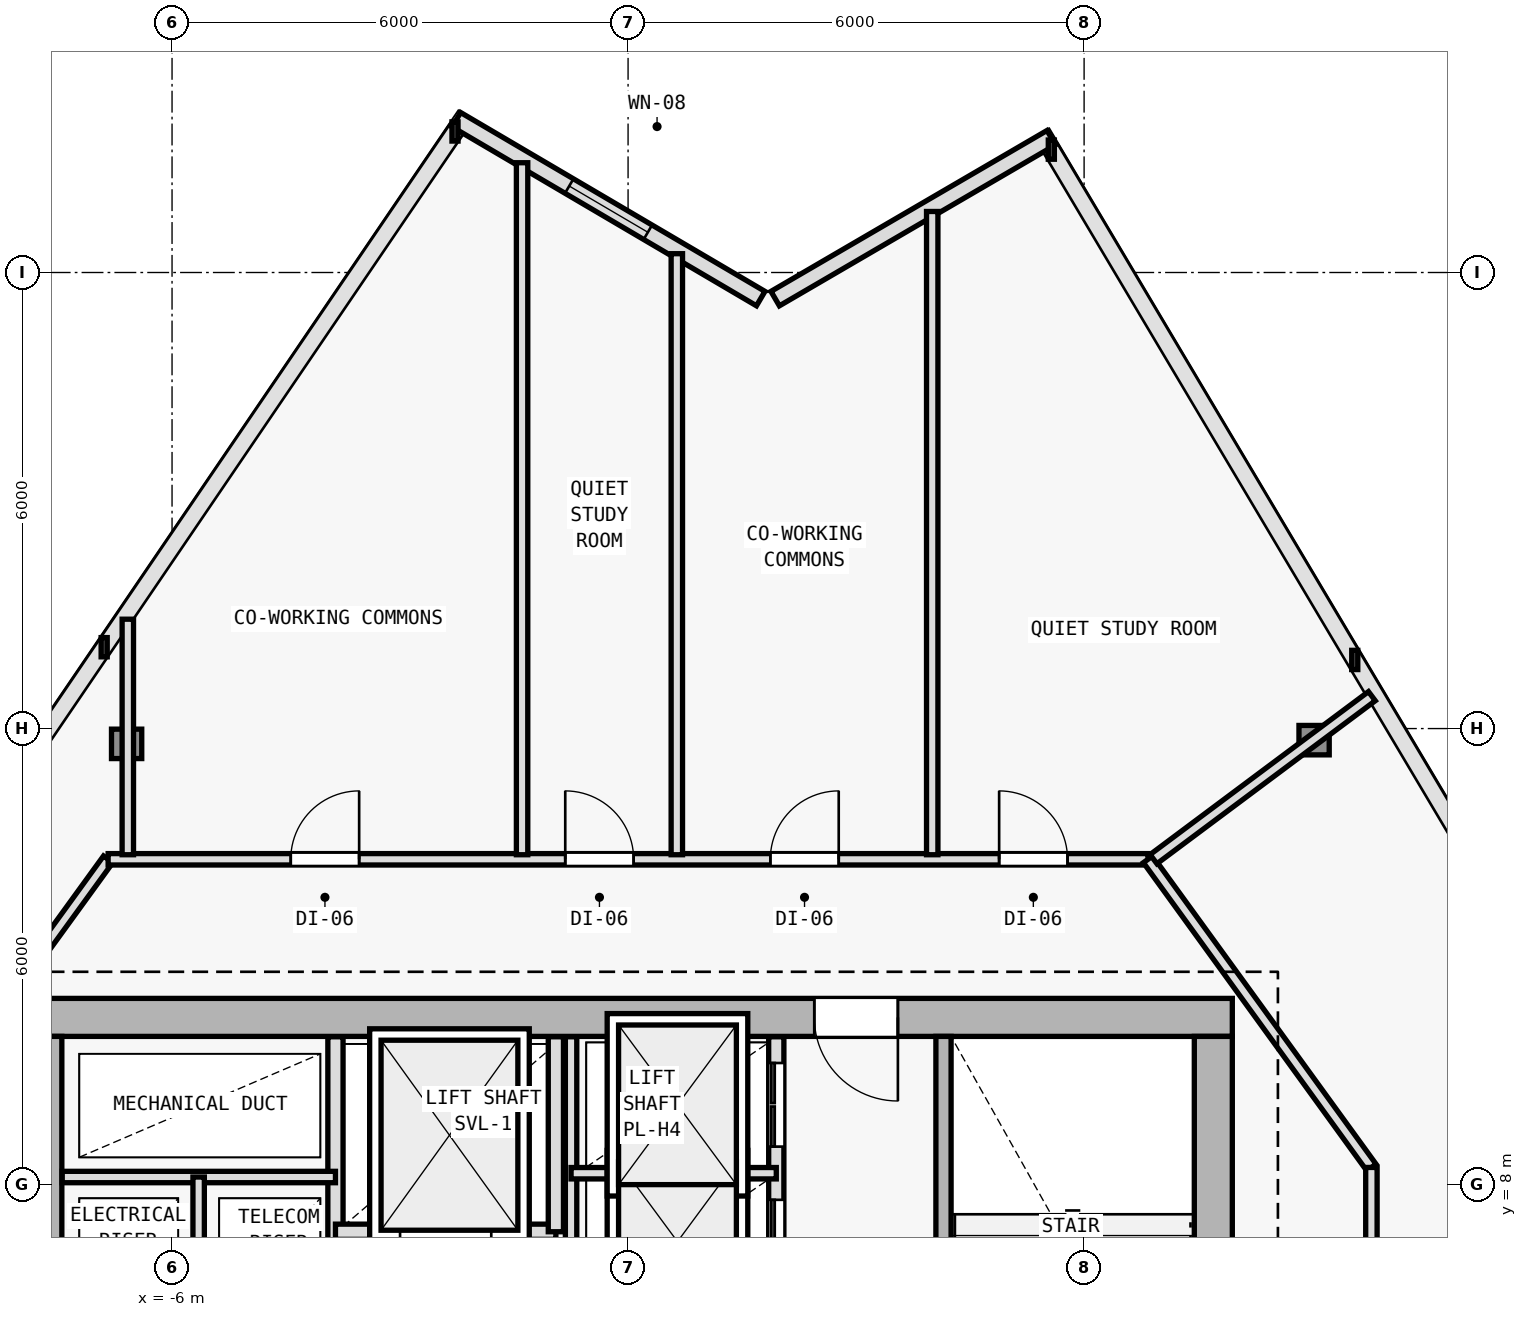
"""IFC4 building model, lengths in metres.
Left out: names, types, materials, properties, quantities, classifications, styles, units other than length and angle.
Written with IfcOpenShell. Run it as: python <this file> out.ifc"""

import sys

from ifc_helpers import new_model, si_unit, direction, frame, frame_2d, origin, origin_2d, place, context, subcontext, project, spatial, rectangle, i_section, extrude, element, fill, save


model = new_model("IFC4")
c1 = context("Model", 3, precision=1e-05, world=origin(), true_north=direction((0.0, 1.0)))
c2 = subcontext(c1, "Body", "Model", "MODEL_VIEW")
j1 = project(units=[si_unit("LENGTHUNIT", "METRE"), si_unit("PLANEANGLEUNIT", "RADIAN")], contexts=[c1])
p1 = place(None, origin())
s1 = spatial("IfcSite", under=j1, at=p1, CompositionType="ELEMENT")
p2 = place(p1, origin())
s2 = spatial("IfcBuilding", under=s1, at=p2, CompositionType="ELEMENT")
p3 = place(p2, frame((0.0, 0.0, 190.2)))
s3 = spatial("IfcBuildingStorey", under=s2, at=p3, CompositionType="ELEMENT", Elevation=190.2)
for number, where, z_axis, x_axis in (
    (1, (7.7, 10.2, 0.0), (0.0, 0.0, 1.0), (1.0, 0.0, 0.0)),
    (2, (-7.7, 10.2, 0.0), (0.0, 0.0, 1.0), (1.0, 0.0, 0.0)),
):
    element("IfcColumn", number, at=place(p3, frame(where, z_axis=z_axis, x_axis=x_axis)), inside=s3, PredefinedType="COLUMN", context=c2, shape_type="SweptSolid", body=[
        extrude(i_section(OverallWidth=0.404, OverallDepth=0.407, WebThickness=0.017, FlangeThickness=0.028, FilletRadius=0.015, at=origin_2d()), origin(), (0.0, 0.0, 1.0), 4.5),
    ])
p4 = place(p3, frame((9.026, 13.847, 0.006), z_axis=(-0.009354007007, -0.002012199182, 0.999954225756), x_axis=(0.210305364179, -0.977635746993, 0.0)))
e3 = element("IfcColumn", 3, at=p4, inside=s3, PredefinedType="COLUMN", context=c2, shape_type="SweptSolid", body=[
    extrude(i_section(OverallWidth=0.398, OverallDepth=0.387, WebThickness=0.013, FlangeThickness=0.022, FilletRadius=0.015, at=origin_2d()), origin(), (0.0, 0.0, 1.0), 4.489),
])
p5 = place(p3, frame((-6.598, 13.799, 0.006), z_axis=(0.007015639536, -0.002012237696, 0.999973365496), x_axis=(0.275705143097, 0.961242255662, 0.0)))
e4 = element("IfcColumn", 4, at=p5, inside=s3, PredefinedType="COLUMN", context=c2, shape_type="SweptSolid", body=[
    extrude(i_section(OverallWidth=0.398, OverallDepth=0.387, WebThickness=0.013, FlangeThickness=0.022, FilletRadius=0.015, at=origin_2d()), origin(), (0.0, 0.0, 1.0), 4.489),
])
p6 = place(p3, frame((1.935, 19.656, 0.0), z_axis=(0.0, 0.0, 1.0), x_axis=(0.863987356641, 0.503513502862, 0.0)))
e5 = element("IfcWall", 5, at=p6, inside=s3, PredefinedType="SOLIDWALL", context=c2, shape_type="SweptSolid", body=[
    extrude(rectangle(XDim=4.204, YDim=0.22, at=frame_2d((2.102, 0.0))), origin(), (0.0, 0.0, 1.0), 4.25),
])
p7 = place(p3, frame((-2.259, 22.01, 0.0), z_axis=(0.0, 0.0, 1.0), x_axis=(0.862123324624, -0.506698503193, 0.0)))
e6 = element("IfcWall", 6, at=p7, inside=s3, PredefinedType="SOLIDWALL", context=c2, shape_type="SweptSolid", body=[
    extrude(rectangle(XDim=4.645, YDim=0.22, at=frame_2d((2.322, 0.0))), origin(), (0.0, 0.0, 1.0), 4.25),
])
p8 = place(p7, frame((1.722, 0.0, 0.62)))
e7 = element("IfcOpeningElement", 7, at=p8, cuts=e6, PredefinedType="OPENING", context=c2, shape_type="SweptSolid", body=[
    extrude(rectangle(XDim=1.2, YDim=1.8, at=frame_2d((0.6, 0.9))), frame((0.0, 0.12, 0.0), z_axis=(0.0, -1.0, 0.0), x_axis=(1.0, 0.0, 0.0)), (0.0, 0.0, 1.0), 0.24),
])
p9 = place(p3, frame((7.95, 10.2, 0.0), z_axis=(0.0, 0.0, 1.0), x_axis=(-1.0, 0.0, 0.0)))
e8 = element("IfcWall", 8, at=p9, inside=s3, PredefinedType="SHEAR", context=c2, shape_type="SweptSolid", body=[
    extrude(rectangle(XDim=15.9, YDim=0.5, at=frame_2d((7.95, 0.0))), origin(), (0.0, 0.0, 1.0), 4.25),
])
p10 = place(p9, frame((4.4, 0.0, 0.0)))
e9 = element("IfcOpeningElement", 9, at=p10, cuts=e8, PredefinedType="OPENING", context=c2, shape_type="SweptSolid", body=[
    extrude(rectangle(XDim=1.1, YDim=2.15, at=frame_2d((0.55, 1.075))), frame((0.0, 0.26, 0.0), z_axis=(0.0, -1.0, 0.0), x_axis=(1.0, 0.0, 0.0)), (0.0, 0.0, 1.0), 0.52),
])
p11 = place(p3, frame((-7.7, -9.15, 0.0), z_axis=(0.0, 0.0, 1.0), x_axis=(0.0, 1.0, 0.0)))
e10 = element("IfcWall", 10, at=p11, inside=s3, PredefinedType="SHEAR", context=c2, shape_type="SweptSolid", body=[
    extrude(rectangle(XDim=19.1, YDim=0.5, at=frame_2d((9.55, 0.0))), origin(), (0.0, 0.0, 1.0), 4.25),
])
p12 = place(p11, frame((12.7, 0.0, 0.0)))
e11 = element("IfcOpeningElement", 11, at=p12, cuts=e10, PredefinedType="OPENING", context=c2, shape_type="SweptSolid", body=[
    extrude(rectangle(XDim=1.1, YDim=2.15, at=frame_2d((0.55, 1.075))), frame((0.0, 0.26, 0.0), z_axis=(0.0, -1.0, 0.0), x_axis=(1.0, 0.0, 0.0)), (0.0, 0.0, 1.0), 0.52),
])
p13 = place(p3, frame((7.7, 9.95, 0.0), z_axis=(0.0, 0.0, 1.0), x_axis=(0.0, -1.0, 0.0)))
e12 = element("IfcWall", 12, at=p13, inside=s3, PredefinedType="SHEAR", context=c2, shape_type="SweptSolid", body=[
    extrude(rectangle(XDim=19.1, YDim=0.5, at=frame_2d((9.55, 0.0))), origin(), (0.0, 0.0, 1.0), 4.25),
])
p14 = place(p3, frame((-3.85, 1.35, 0.0), z_axis=(0.0, 0.0, 1.0), x_axis=(0.0, 1.0, 0.0)))
e13 = element("IfcWall", 13, at=p14, inside=s3, PredefinedType="SOLIDWALL", context=c2, shape_type="SweptSolid", body=[
    extrude(rectangle(XDim=8.595, YDim=0.2, at=frame_2d((4.297, 0.0))), origin(), (0.0, 0.0, 1.0), 4.25),
])
p15 = place(p14, frame((1.5, 0.0, 0.0)))
e14 = element("IfcOpeningElement", 14, at=p15, cuts=e13, PredefinedType="OPENING", context=c2, shape_type="SweptSolid", body=[
    extrude(rectangle(XDim=1.0, YDim=2.15, at=frame_2d((0.5, 1.075))), frame((0.0, 0.11, 0.0), z_axis=(0.0, -1.0, 0.0), x_axis=(1.0, 0.0, 0.0)), (0.0, 0.0, 1.0), 0.22),
])
p16 = place(p14, frame((3.18, 0.0, 0.0)))
e15 = element("IfcOpeningElement", 15, at=p16, cuts=e13, PredefinedType="OPENING", context=c2, shape_type="SweptSolid", body=[
    extrude(rectangle(XDim=1.0, YDim=2.15, at=frame_2d((0.5, 1.075))), frame((0.0, 0.11, 0.0), z_axis=(0.0, -1.0, 0.0), x_axis=(1.0, 0.0, 0.0)), (0.0, 0.0, 1.0), 0.22),
])
p17 = place(p3, frame((-7.445, 8.1, 0.0), z_axis=(0.0, 0.0, 1.0), x_axis=(1.0, 0.0, 0.0)))
e16 = element("IfcWall", 16, at=p17, inside=s3, PredefinedType="PARTITIONING", context=c2, shape_type="SweptSolid", body=[
    extrude(rectangle(XDim=3.595, YDim=0.15, at=frame_2d((1.797, 0.0))), origin(), (0.0, 0.0, 1.0), 4.25),
])
p18 = place(p3, frame((-5.65, 6.05, 0.0), z_axis=(0.0, 0.0, 1.0), x_axis=(0.0, 1.0, 0.0)))
e17 = element("IfcWall", 17, at=p18, inside=s3, PredefinedType="PARTITIONING", context=c2, shape_type="SweptSolid", body=[
    extrude(rectangle(XDim=2.05, YDim=0.15, at=frame_2d((1.025, 0.0))), origin(), (0.0, 0.0, 1.0), 4.25),
])
p19 = place(p3, frame((4.15, 2.75, 0.0), z_axis=(0.0, 0.0, 1.0), x_axis=(0.0, 1.0, 0.0)))
e18 = element("IfcWall", 18, at=p19, inside=s3, PredefinedType="SOLIDWALL", context=c2, shape_type="SweptSolid", body=[
    extrude(rectangle(XDim=7.2, YDim=0.2, at=frame_2d((3.6, 0.0))), origin(), (0.0, 0.0, 1.0), 4.25),
])
p20 = place(p19, frame((0.35, 0.0, 0.0)))
e19 = element("IfcOpeningElement", 19, at=p20, cuts=e18, PredefinedType="OPENING", context=c2, shape_type="SweptSolid", body=[
    extrude(rectangle(XDim=1.0, YDim=2.15, at=frame_2d((0.5, 1.075))), frame((0.0, 0.11, 0.0), z_axis=(0.0, -1.0, 0.0), x_axis=(1.0, 0.0, 0.0)), (0.0, 0.0, 1.0), 0.22),
])
p21 = place(p3, frame((-3.85, 7.38, 0.0), z_axis=(0.0, 0.0, 1.0), x_axis=(1.0, 0.0, 0.0)))
e20 = element("IfcWall", 20, at=p21, inside=s3, PredefinedType="SOLIDWALL", context=c2, shape_type="SweptSolid", body=[
    extrude(rectangle(XDim=2.9, YDim=0.2, at=frame_2d((1.45, 0.0))), origin(), (0.0, 0.0, 1.0), 4.25),
])
p22 = place(p21, frame((0.85, 0.0, 0.0)))
e21 = element("IfcOpeningElement", 21, at=p22, cuts=e20, PredefinedType="OPENING", context=c2, shape_type="SweptSolid", body=[
    extrude(rectangle(XDim=1.2, YDim=2.2, at=frame_2d((0.6, 1.1))), frame((0.0, 0.11, 0.0), z_axis=(0.0, -1.0, 0.0), x_axis=(1.0, 0.0, 0.0)), (0.0, 0.0, 1.0), 0.22),
])
p23 = place(p3, frame((-0.95, 7.38, 0.0), z_axis=(0.0, 0.0, 1.0), x_axis=(0.0, 1.0, 0.0)))
e22 = element("IfcWall", 22, at=p23, inside=s3, PredefinedType="SOLIDWALL", context=c2, shape_type="SweptSolid", body=[
    extrude(rectangle(XDim=2.565, YDim=0.2, at=frame_2d((1.283, 0.0))), origin(), (0.0, 0.0, 1.0), 4.25),
])
p24 = place(p3, frame((1.95, 2.65, 0.0), z_axis=(0.0, 0.0, 1.0), x_axis=(0.0, 1.0, 0.0)))
e23 = element("IfcWall", 23, at=p24, inside=s3, PredefinedType="SOLIDWALL", context=c2, shape_type="SweptSolid", body=[
    extrude(rectangle(XDim=7.295, YDim=0.2, at=frame_2d((3.647, 0.0))), origin(), (0.0, 0.0, 1.0), 4.25),
])
p25 = place(p24, frame((0.45, 0.0, 0.0)))
e24 = element("IfcOpeningElement", 24, at=p25, cuts=e23, PredefinedType="OPENING", context=c2, shape_type="SweptSolid", body=[
    extrude(rectangle(XDim=1.1, YDim=2.15, at=frame_2d((0.55, 1.075))), frame((0.0, 0.11, 0.0), z_axis=(0.0, -1.0, 0.0), x_axis=(1.0, 0.0, 0.0)), (0.0, 0.0, 1.0), 0.22),
])
p26 = place(p24, frame((2.25, 0.0, 0.0)))
e25 = element("IfcOpeningElement", 25, at=p26, cuts=e23, PredefinedType="OPENING", context=c2, shape_type="SweptSolid", body=[
    extrude(rectangle(XDim=1.1, YDim=2.15, at=frame_2d((0.55, 1.075))), frame((0.0, 0.11, 0.0), z_axis=(0.0, -1.0, 0.0), x_axis=(1.0, 0.0, 0.0)), (0.0, 0.0, 1.0), 0.22),
])
p27 = place(p24, frame((4.05, 0.0, 0.0)))
e26 = element("IfcOpeningElement", 26, at=p27, cuts=e23, PredefinedType="OPENING", context=c2, shape_type="SweptSolid", body=[
    extrude(rectangle(XDim=1.1, YDim=2.15, at=frame_2d((0.55, 1.075))), frame((0.0, 0.11, 0.0), z_axis=(0.0, -1.0, 0.0), x_axis=(1.0, 0.0, 0.0)), (0.0, 0.0, 1.0), 0.22),
])
p28 = place(p24, frame((5.85, 0.0, 0.0)))
e27 = element("IfcOpeningElement", 27, at=p28, cuts=e23, PredefinedType="OPENING", context=c2, shape_type="SweptSolid", body=[
    extrude(rectangle(XDim=1.1, YDim=2.15, at=frame_2d((0.55, 1.075))), frame((0.0, 0.11, 0.0), z_axis=(0.0, -1.0, 0.0), x_axis=(1.0, 0.0, 0.0)), (0.0, 0.0, 1.0), 0.22),
])
p29 = place(p3, frame((-0.75, 5.92, 0.0), z_axis=(0.0, 0.0, 1.0), x_axis=(0.0, 1.0, 0.0)))
e28 = element("IfcWall", 28, at=p29, inside=s3, PredefinedType="PARTITIONING", context=c2, shape_type="SweptSolid", body=[
    extrude(rectangle(XDim=4.025, YDim=0.15, at=frame_2d((2.013, 0.0))), origin(), (0.0, 0.0, 1.0), 4.25),
])
p30 = place(p3, frame((-0.75, 8.15, 0.0), z_axis=(0.0, 0.0, 1.0), x_axis=(1.0, 0.0, 0.0)))
e29 = element("IfcWall", 29, at=p30, inside=s3, PredefinedType="PARTITIONING", context=c2, shape_type="SweptSolid", body=[
    extrude(rectangle(XDim=2.7, YDim=0.15, at=frame_2d((1.35, 0.0))), origin(), (0.0, 0.0, 1.0), 4.25),
])
p31 = place(p3, frame((-9.78, 8.226, 0.0), z_axis=(0.0, 0.0, 1.0), x_axis=(0.586956386413, 0.809618552436, 0.0)))
e30 = element("IfcWall", 30, at=p31, inside=s3, PredefinedType="PARTITIONING", context=c2, shape_type="SweptSolid", body=[
    extrude(rectangle(XDim=5.008, YDim=0.15, at=frame_2d((2.504, 0.0))), origin(), (0.0, 0.0, 1.0), 3.905),
])
p32 = place(p31, frame((1.154, 0.0, 0.0)))
e31 = element("IfcOpeningElement", 31, at=p32, cuts=e30, PredefinedType="OPENING", context=c2, shape_type="SweptSolid", body=[
    extrude(rectangle(XDim=0.9, YDim=2.1, at=frame_2d((0.45, 1.05))), frame((0.0, 0.085, 0.0), z_axis=(0.0, -1.0, 0.0), x_axis=(1.0, 0.0, 0.0)), (0.0, 0.0, 1.0), 0.17),
])
p33 = place(p3, frame((-6.841, 12.28, 0.0), z_axis=(0.0, 0.0, 1.0), x_axis=(1.0, 0.0, 0.0)))
e32 = element("IfcWall", 32, at=p33, inside=s3, PredefinedType="PARTITIONING", context=c2, shape_type="SweptSolid", body=[
    extrude(rectangle(XDim=13.682, YDim=0.15, at=frame_2d((6.841, 0.0))), origin(), (0.0, 0.0, 1.0), 3.905),
])
p34 = place(p33, frame((11.723, 0.0, 0.0)))
e33 = element("IfcOpeningElement", 33, at=p34, cuts=e32, PredefinedType="OPENING", context=c2, shape_type="SweptSolid", body=[
    extrude(rectangle(XDim=0.9, YDim=2.1, at=frame_2d((0.45, 1.05))), frame((0.0, 0.085, 0.0), z_axis=(0.0, -1.0, 0.0), x_axis=(1.0, 0.0, 0.0)), (0.0, 0.0, 1.0), 0.17),
])
p35 = place(p33, frame((8.712, 0.0, 0.0)))
e34 = element("IfcOpeningElement", 34, at=p35, cuts=e32, PredefinedType="OPENING", context=c2, shape_type="SweptSolid", body=[
    extrude(rectangle(XDim=0.9, YDim=2.1, at=frame_2d((0.45, 1.05))), frame((0.0, 0.085, 0.0), z_axis=(0.0, -1.0, 0.0), x_axis=(1.0, 0.0, 0.0)), (0.0, 0.0, 1.0), 0.17),
])
p36 = place(p33, frame((6.014, 0.0, 0.0)))
e35 = element("IfcOpeningElement", 35, at=p36, cuts=e32, PredefinedType="OPENING", context=c2, shape_type="SweptSolid", body=[
    extrude(rectangle(XDim=0.9, YDim=2.1, at=frame_2d((0.45, 1.05))), frame((0.0, 0.085, 0.0), z_axis=(0.0, -1.0, 0.0), x_axis=(1.0, 0.0, 0.0)), (0.0, 0.0, 1.0), 0.17),
])
p37 = place(p33, frame((2.403, 0.0, 0.0)))
e36 = element("IfcOpeningElement", 36, at=p37, cuts=e32, PredefinedType="OPENING", context=c2, shape_type="SweptSolid", body=[
    extrude(rectangle(XDim=0.9, YDim=2.1, at=frame_2d((0.45, 1.05))), frame((0.0, 0.085, 0.0), z_axis=(0.0, -1.0, 0.0), x_axis=(1.0, 0.0, 0.0)), (0.0, 0.0, 1.0), 0.17),
])
p38 = place(p3, frame((6.841, 12.28, 0.0), z_axis=(0.0, 0.0, 1.0), x_axis=(0.586956386413, -0.809618552436, 0.0)))
e37 = element("IfcWall", 37, at=p38, inside=s3, PredefinedType="PARTITIONING", context=c2, shape_type="SweptSolid", body=[
    extrude(rectangle(XDim=5.008, YDim=0.15, at=frame_2d((2.504, 0.0))), origin(), (0.0, 0.0, 1.0), 3.775),
])
p39 = place(p3, frame((9.78, 8.226, 0.0), z_axis=(0.0, 0.0, 1.0), x_axis=(0.0, -1.0, 0.0)))
e38 = element("IfcWall", 38, at=p39, inside=s3, PredefinedType="PARTITIONING", context=c2, shape_type="SweptSolid", body=[
    extrude(rectangle(XDim=19.706, YDim=0.15, at=frame_2d((9.853, 0.0))), origin(), (0.0, 0.0, 1.0), 3.675),
])
p40 = place(p39, frame((18.038, 0.0, 0.0)))
e39 = element("IfcOpeningElement", 39, at=p40, cuts=e38, PredefinedType="OPENING", context=c2, shape_type="SweptSolid", body=[
    extrude(rectangle(XDim=0.9, YDim=2.1, at=frame_2d((0.45, 1.05))), frame((0.0, 0.085, 0.0), z_axis=(0.0, -1.0, 0.0), x_axis=(1.0, 0.0, 0.0)), (0.0, 0.0, 1.0), 0.17),
])
p41 = place(p39, frame((16.388, 0.0, 0.0)))
e40 = element("IfcOpeningElement", 40, at=p41, cuts=e38, PredefinedType="OPENING", context=c2, shape_type="SweptSolid", body=[
    extrude(rectangle(XDim=0.85, YDim=2.1, at=frame_2d((0.425, 1.05))), frame((0.0, 0.085, 0.0), z_axis=(0.0, -1.0, 0.0), x_axis=(1.0, 0.0, 0.0)), (0.0, 0.0, 1.0), 0.17),
])
p42 = place(p39, frame((14.967, 0.0, 0.0)))
e41 = element("IfcOpeningElement", 41, at=p42, cuts=e38, PredefinedType="OPENING", context=c2, shape_type="SweptSolid", body=[
    extrude(rectangle(XDim=0.85, YDim=2.1, at=frame_2d((0.425, 1.05))), frame((0.0, 0.085, 0.0), z_axis=(0.0, -1.0, 0.0), x_axis=(1.0, 0.0, 0.0)), (0.0, 0.0, 1.0), 0.17),
])
p43 = place(p39, frame((6.942, 0.0, 0.0)))
e42 = element("IfcOpeningElement", 42, at=p43, cuts=e38, PredefinedType="OPENING", context=c2, shape_type="SweptSolid", body=[
    extrude(rectangle(XDim=0.9, YDim=2.1, at=frame_2d((0.45, 1.05))), frame((0.0, 0.085, 0.0), z_axis=(0.0, -1.0, 0.0), x_axis=(1.0, 0.0, 0.0)), (0.0, 0.0, 1.0), 0.17),
])
p44 = place(p3, frame((6.913, 12.282, 0.0), z_axis=(0.0, 0.0, 1.0), x_axis=(0.80143603656, 0.598080495672, 0.0)))
e43 = element("IfcWall", 43, at=p44, inside=s3, PredefinedType="PARTITIONING", context=c2, shape_type="SweptSolid", body=[
    extrude(rectangle(XDim=3.585, YDim=0.15, at=frame_2d((1.792, 0.0))), origin(), (0.0, 0.0, 1.0), 3.835),
])
p45 = place(p3, frame((-6.582, 12.34, 0.0), z_axis=(0.0, 0.0, 1.0), x_axis=(0.0, 1.0, 0.0)))
e44 = element("IfcWall", 44, at=p45, inside=s3, PredefinedType="PARTITIONING", context=c2, shape_type="SweptSolid", body=[
    extrude(rectangle(XDim=3.099, YDim=0.15, at=frame_2d((1.549, 0.0))), origin(), (0.0, 0.0, 1.0), 3.835),
])
p46 = place(p3, frame((0.642, 12.34, 0.0), z_axis=(0.0, 0.0, 1.0), x_axis=(0.0, 1.0, 0.0)))
e45 = element("IfcWall", 45, at=p46, inside=s3, PredefinedType="PARTITIONING", context=c2, shape_type="SweptSolid", body=[
    extrude(rectangle(XDim=7.907, YDim=0.15, at=frame_2d((3.954, 0.0))), origin(), (0.0, 0.0, 1.0), 3.835),
])
p47 = place(p3, frame((4.002, 12.34, 0.0), z_axis=(0.0, 0.0, 1.0), x_axis=(0.0, 1.0, 0.0)))
e46 = element("IfcWall", 46, at=p47, inside=s3, PredefinedType="PARTITIONING", context=c2, shape_type="SweptSolid", body=[
    extrude(rectangle(XDim=8.463, YDim=0.15, at=frame_2d((4.231, 0.0))), origin(), (0.0, 0.0, 1.0), 3.835),
])
p48 = place(p3, frame((-1.395, 12.34, 0.0), z_axis=(0.0, 0.0, 1.0), x_axis=(0.0, 1.0, 0.0)))
e47 = element("IfcWall", 47, at=p48, inside=s3, PredefinedType="PARTITIONING", context=c2, shape_type="SweptSolid", body=[
    extrude(rectangle(XDim=9.104, YDim=0.15, at=frame_2d((4.552, 0.0))), origin(), (0.0, 0.0, 1.0), 3.835),
])
p49 = place(p8, origin())
e48 = element("IfcWindow", 48, at=p49, inside=s3, PartitioningType="SINGLE_PANEL", PredefinedType="WINDOW", context=c2, shape_type="SweptSolid", body=[
    extrude(rectangle(XDim=1.2, YDim=1.8, at=frame_2d((0.6, 0.9))), frame((0.0, 0.03, 0.0), z_axis=(0.0, -1.0, 0.0), x_axis=(1.0, 0.0, 0.0)), (0.0, 0.0, 1.0), 0.06),
])
fill(e7, e48)
p50 = place(p10, origin())
e49 = element("IfcDoor", 49, at=p50, inside=s3, OperationType="SINGLE_SWING_LEFT", PredefinedType="DOOR", context=c2, shape_type="SweptSolid", body=[
    extrude(rectangle(XDim=1.1, YDim=2.15, at=frame_2d((0.55, 1.075))), frame((0.0, 0.025, 0.0), z_axis=(0.0, -1.0, 0.0), x_axis=(1.0, 0.0, 0.0)), (0.0, 0.0, 1.0), 0.05),
])
fill(e9, e49)
p51 = place(p22, origin())
e50 = element("IfcDoor", 50, at=p51, inside=s3, OperationType="DOUBLE_DOOR_SLIDING", PredefinedType="DOOR", context=c2, shape_type="SweptSolid", body=[
    extrude(rectangle(XDim=1.2, YDim=2.2, at=frame_2d((0.6, 1.1))), frame((0.0, 0.025, 0.0), z_axis=(0.0, -1.0, 0.0), x_axis=(1.0, 0.0, 0.0)), (0.0, 0.0, 1.0), 0.05),
])
fill(e21, e50)
p52 = place(p27, origin())
e51 = element("IfcDoor", 51, at=p52, inside=s3, OperationType="DOUBLE_DOOR_SLIDING", PredefinedType="DOOR", context=c2, shape_type="SweptSolid", body=[
    extrude(rectangle(XDim=1.1, YDim=2.15, at=frame_2d((0.55, 1.075))), frame((0.0, 0.025, 0.0), z_axis=(0.0, -1.0, 0.0), x_axis=(1.0, 0.0, 0.0)), (0.0, 0.0, 1.0), 0.05),
])
fill(e26, e51)
p53 = place(p28, origin())
e52 = element("IfcDoor", 52, at=p53, inside=s3, OperationType="DOUBLE_DOOR_SLIDING", PredefinedType="DOOR", context=c2, shape_type="SweptSolid", body=[
    extrude(rectangle(XDim=1.1, YDim=2.15, at=frame_2d((0.55, 1.075))), frame((0.0, 0.025, 0.0), z_axis=(0.0, -1.0, 0.0), x_axis=(1.0, 0.0, 0.0)), (0.0, 0.0, 1.0), 0.05),
])
fill(e27, e52)
p54 = place(p34, origin())
e53 = element("IfcDoor", 53, at=p54, inside=s3, OperationType="SINGLE_SWING_LEFT", PredefinedType="DOOR", context=c2, shape_type="SweptSolid", body=[
    extrude(rectangle(XDim=0.9, YDim=2.1, at=frame_2d((0.45, 1.05))), frame((0.0, 0.025, 0.0), z_axis=(0.0, -1.0, 0.0), x_axis=(1.0, 0.0, 0.0)), (0.0, 0.0, 1.0), 0.05),
])
fill(e33, e53)
p55 = place(p35, origin())
e54 = element("IfcDoor", 54, at=p55, inside=s3, OperationType="SINGLE_SWING_RIGHT", PredefinedType="DOOR", context=c2, shape_type="SweptSolid", body=[
    extrude(rectangle(XDim=0.9, YDim=2.1, at=frame_2d((0.45, 1.05))), frame((0.0, 0.025, 0.0), z_axis=(0.0, -1.0, 0.0), x_axis=(1.0, 0.0, 0.0)), (0.0, 0.0, 1.0), 0.05),
])
fill(e34, e54)
p56 = place(p36, origin())
e55 = element("IfcDoor", 55, at=p56, inside=s3, OperationType="SINGLE_SWING_LEFT", PredefinedType="DOOR", context=c2, shape_type="SweptSolid", body=[
    extrude(rectangle(XDim=0.9, YDim=2.1, at=frame_2d((0.45, 1.05))), frame((0.0, 0.025, 0.0), z_axis=(0.0, -1.0, 0.0), x_axis=(1.0, 0.0, 0.0)), (0.0, 0.0, 1.0), 0.05),
])
fill(e35, e55)
p57 = place(p37, origin())
e56 = element("IfcDoor", 56, at=p57, inside=s3, OperationType="SINGLE_SWING_RIGHT", PredefinedType="DOOR", context=c2, shape_type="SweptSolid", body=[
    extrude(rectangle(XDim=0.9, YDim=2.1, at=frame_2d((0.45, 1.05))), frame((0.0, 0.025, 0.0), z_axis=(0.0, -1.0, 0.0), x_axis=(1.0, 0.0, 0.0)), (0.0, 0.0, 1.0), 0.05),
])
fill(e36, e56)
save(model, sys.argv[1])
